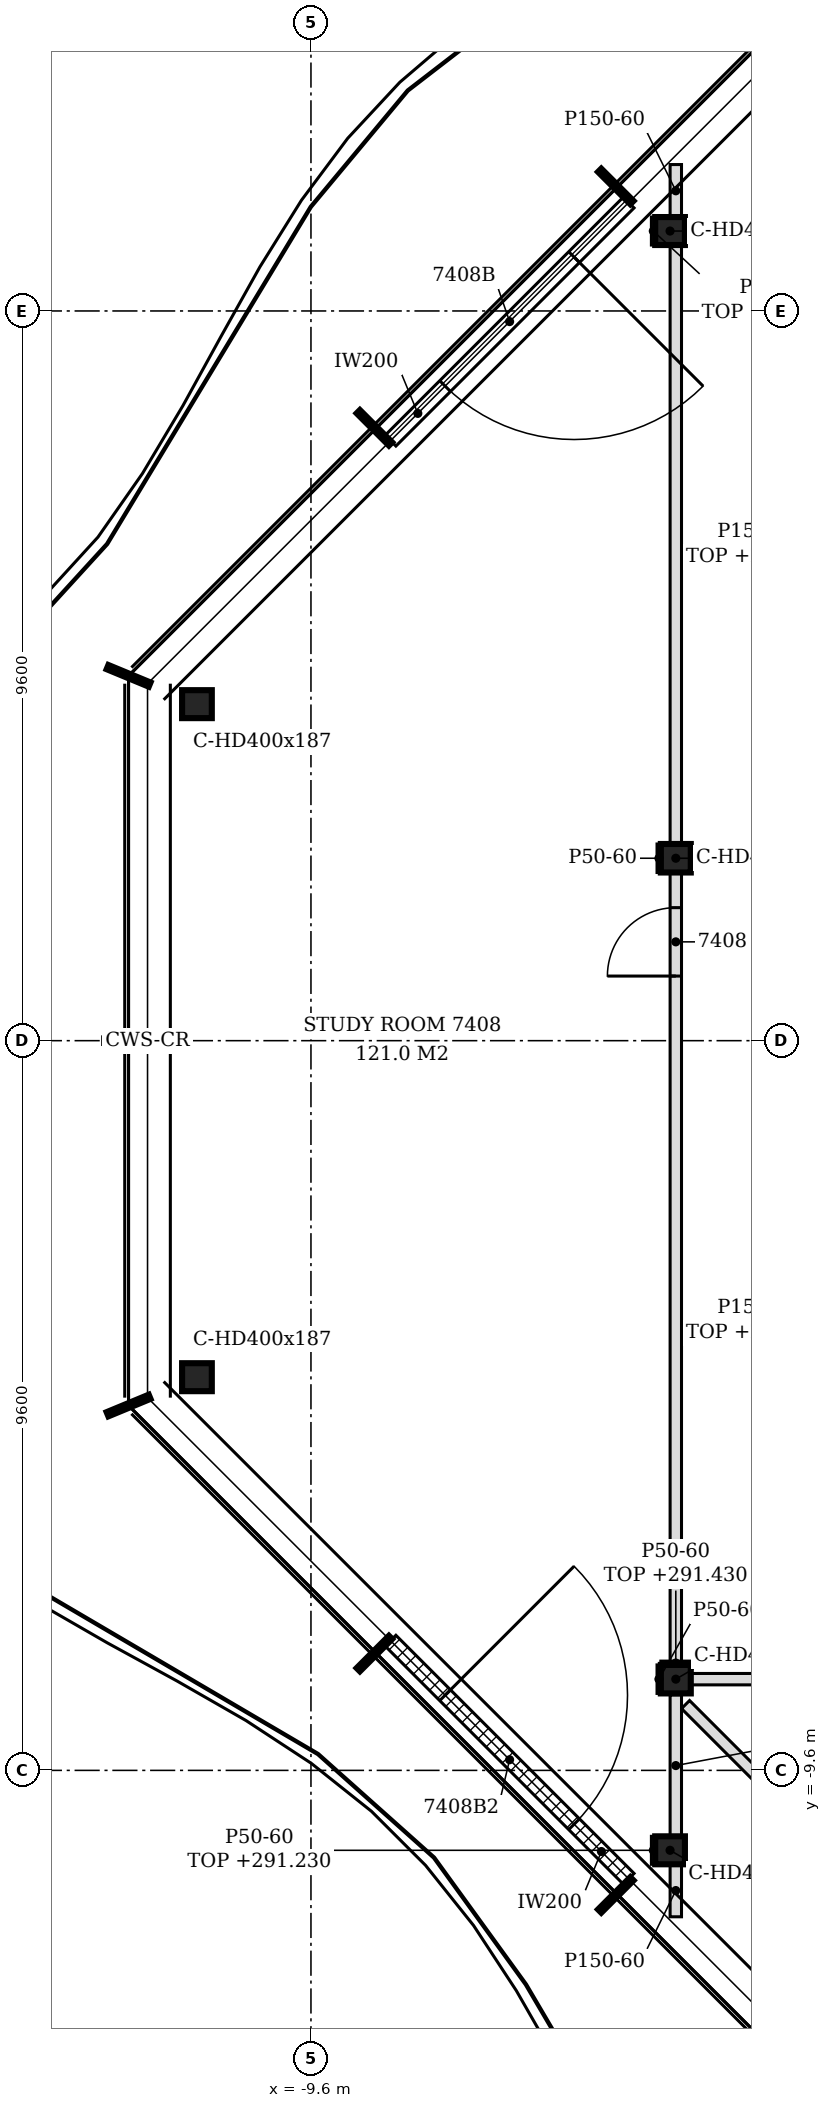
"""IFC4 building model, lengths in metres.
Left out: names, types, materials, properties, quantities, classifications, styles, units other than length and angle.
Written with IfcOpenShell. Run it as: python <this file> out.ifc"""

import sys

from ifc_helpers import new_model, si_unit, direction, frame, frame_2d, origin, origin_2d, place, context, subcontext, project, spatial, polyline, rectangle, i_section, outline, extrude, element, fill, save


model = new_model("IFC4")
c1 = context("Model", 3, precision=1e-05, world=origin(), true_north=direction((0.0, 1.0)))
c2 = subcontext(c1, "Body", "Model", "MODEL_VIEW")
j1 = project(units=[si_unit("LENGTHUNIT", "METRE"), si_unit("PLANEANGLEUNIT", "RADIAN")], contexts=[c1])
p1 = place(None, origin())
s1 = spatial("IfcSite", under=j1, at=p1, CompositionType="ELEMENT")
p2 = place(p1, origin())
s2 = spatial("IfcBuilding", under=s1, at=p2, CompositionType="ELEMENT")
p3 = place(p2, frame((0.0, 0.0, 288.6)))
s3 = spatial("IfcBuildingStorey", under=s2, at=p3, CompositionType="ELEMENT", Elevation=288.6)
for number, where, z_axis, x_axis in (
    (1, (-4.876, 10.652, -0.15), (0.0, 0.0, 1.0), (1.0, 0.0, 0.0)),
    (2, (-11.1, 4.427, -0.15), (0.0, 0.0, 1.0), (1.0, 0.0, 0.0)),
    (3, (-11.1, -4.427, -0.15), (0.0, 0.0, 1.0), (1.0, 0.0, 0.0)),
    (4, (-4.876, -10.652, -0.15), (0.0, 0.0, 1.0), (1.0, 0.0, 0.0)),
):
    element("IfcColumn", number, at=place(p3, frame(where, z_axis=z_axis, x_axis=x_axis)), inside=s3, PredefinedType="COLUMN", context=c2, shape_type="SweptSolid", body=[
        extrude(i_section(OverallWidth=0.391, OverallDepth=0.368, WebThickness=0.015, FlangeThickness=0.024, FilletRadius=0.015, at=origin_2d()), origin(), (0.0, 0.0, 1.0), 3.6),
    ])
for number, where, z_axis, x_axis in (
    (5, (-4.8, -8.4, -0.15), (0.0, 0.0, 1.0), (1.0, 0.0, 0.0)),
    (6, (-4.8, 2.4, -0.15), (0.0, 0.0, 1.0), (1.0, 0.0, 0.0)),
):
    element("IfcColumn", number, at=place(p3, frame(where, z_axis=z_axis, x_axis=x_axis)), inside=s3, PredefinedType="COLUMN", context=c2, shape_type="SweptSolid", body=[
        extrude(i_section(OverallWidth=0.394, OverallDepth=0.375, WebThickness=0.017, FlangeThickness=0.028, FilletRadius=0.015, at=origin_2d()), origin(), (0.0, 0.0, 1.0), 3.6),
    ])
p4 = place(p3, frame((-5.42, 11.026, 0.0), z_axis=(0.0, 0.0, 1.0), x_axis=(-0.707134329907, -0.707079231393, 0.0)))
e7 = element("IfcWall", 7, at=p4, inside=s3, PredefinedType="NOTDEFINED", context=c2, shape_type="SweptSolid", body=[
    extrude(rectangle(XDim=4.431, YDim=0.2, at=frame_2d((2.215, 0.0))), origin(), (0.0, 0.0, 1.0), 3.45),
])
p5 = place(p4, frame((1.015, 0.0, 0.0)))
e8 = element("IfcOpeningElement", 8, at=p5, cuts=e7, PredefinedType="OPENING", context=c2, shape_type="SweptSolid", body=[
    extrude(rectangle(XDim=2.4, YDim=2.4, at=frame_2d((1.2, 1.2))), frame((0.0, 0.11, 0.0), z_axis=(0.0, -1.0, 0.0), x_axis=(1.0, 0.0, 0.0)), (0.0, 0.0, 1.0), 0.22),
])
p6 = place(p3, frame((-8.553, -7.893, 0.0), z_axis=(0.0, 0.0, 1.0), x_axis=(0.707134329907, -0.707079231393, 0.0)))
e9 = element("IfcWall", 9, at=p6, inside=s3, PredefinedType="NOTDEFINED", context=c2, shape_type="SweptSolid", body=[
    extrude(rectangle(XDim=4.431, YDim=0.2, at=frame_2d((2.215, 0.0))), origin(), (0.0, 0.0, 1.0), 3.45),
])
p7 = place(p6, frame((1.015, 0.0, 0.0)))
e10 = element("IfcOpeningElement", 10, at=p7, cuts=e9, PredefinedType="OPENING", context=c2, shape_type="SweptSolid", body=[
    extrude(rectangle(XDim=2.4, YDim=2.4, at=frame_2d((1.2, 1.2))), frame((0.0, 0.11, 0.0), z_axis=(0.0, -1.0, 0.0), x_axis=(1.0, 0.0, 0.0)), (0.0, 0.0, 1.0), 0.22),
])
p8 = place(p3, frame((-0.128, -13.278, 0.0), z_axis=(0.0, 0.0, 1.0), x_axis=(-0.707106781187, 0.707106781187, 0.0)))
e11 = element("IfcWall", 11, at=p8, inside=s3, PredefinedType="PARTITIONING", context=c2, shape_type="SweptSolid", body=[
    extrude(rectangle(XDim=6.427, YDim=0.15, at=frame_2d((3.213, 0.0))), origin(), (0.0, 0.0, 1.0), 3.03),
])
p9 = place(p3, frame((-4.8, -11.526, 0.0), z_axis=(0.0, 0.0, 1.0), x_axis=(0.0, 1.0, 0.0)))
e12 = element("IfcWall", 12, at=p9, inside=s3, PredefinedType="PARTITIONING", context=c2, shape_type="SweptSolid", body=[
    extrude(outline(polyline([(0.0, 0.0), (0.691, 0.0), (0.691, 2.63), (0.229, 2.63), (0.227, 3.45), (0.0, 3.45), (0.0, 0.0)])), frame((0.0, 0.075, 0.0), z_axis=(0.0, -1.0, 0.0), x_axis=(1.0, 0.0, 0.0)), (0.0, 0.0, 1.0), 0.15),
])
p10 = place(p3, frame((-4.8, -10.468, 0.0), z_axis=(0.0, 0.0, 1.0), x_axis=(0.0, 1.0, 0.0)))
e13 = element("IfcWall", 13, at=p10, inside=s3, PredefinedType="PARTITIONING", context=c2, shape_type="SweptSolid", body=[
    extrude(outline(polyline([(0.0, 0.0), (1.862, 0.0), (1.862, 3.03), (0.31, 3.03), (0.308, 2.63), (0.066, 2.63), (0.064, 3.03), (0.0, 3.03), (0.0, 0.0)])), frame((0.0, 0.075, 0.0), z_axis=(0.0, -1.0, 0.0), x_axis=(1.0, 0.0, 0.0)), (0.0, 0.0, 1.0), 0.15),
])
p11 = place(p3, frame((-4.603, -8.4, 0.0), z_axis=(0.0, 0.0, 1.0), x_axis=(1.0, 0.0, 0.0)))
e14 = element("IfcWall", 14, at=p11, inside=s3, PredefinedType="PARTITIONING", context=c2, shape_type="SweptSolid", body=[
    extrude(rectangle(XDim=4.678, YDim=0.15, at=frame_2d((2.339, 0.0))), origin(), (0.0, 0.0, 1.0), 2.83),
])
p12 = place(p3, frame((-4.8, -8.212, 0.0), z_axis=(0.0, 0.0, 1.0), x_axis=(0.0, 1.0, 0.0)))
e15 = element("IfcWall", 15, at=p12, inside=s3, PredefinedType="PARTITIONING", context=c2, shape_type="SweptSolid", body=[
    extrude(rectangle(XDim=10.425, YDim=0.15, at=frame_2d((5.212, 0.0))), origin(), (0.0, 0.0, 1.0), 2.83),
])
p13 = place(p12, frame((9.062, 0.0, 0.0)))
e16 = element("IfcOpeningElement", 16, at=p13, cuts=e15, PredefinedType="OPENING", context=c2, shape_type="SweptSolid", body=[
    extrude(rectangle(XDim=0.9, YDim=2.1, at=frame_2d((0.45, 1.05))), frame((0.0, 0.085, 0.0), z_axis=(0.0, -1.0, 0.0), x_axis=(1.0, 0.0, 0.0)), (0.0, 0.0, 1.0), 0.17),
])
p14 = place(p3, frame((-4.8, 2.587, 0.0), z_axis=(0.0, 0.0, 1.0), x_axis=(0.0, 1.0, 0.0)))
e17 = element("IfcWall", 17, at=p14, inside=s3, PredefinedType="PARTITIONING", context=c2, shape_type="SweptSolid", body=[
    extrude(outline(polyline([(0.0, 0.0), (7.88, 0.0), (7.88, 2.93), (7.814, 2.93), (7.812, 2.63), (7.57, 2.63), (7.568, 2.93), (0.0, 2.93), (0.0, 0.0)])), frame((0.0, 0.075, 0.0), z_axis=(0.0, -1.0, 0.0), x_axis=(1.0, 0.0, 0.0)), (0.0, 0.0, 1.0), 0.15),
])
p15 = place(p3, frame((-4.8, 10.835, 0.0), z_axis=(0.0, 0.0, 1.0), x_axis=(0.0, 1.0, 0.0)))
e18 = element("IfcWall", 18, at=p15, inside=s3, PredefinedType="PARTITIONING", context=c2, shape_type="SweptSolid", body=[
    extrude(outline(polyline([(0.0, 0.0), (0.691, 0.0), (0.691, 3.45), (0.462, 3.45), (0.46, 2.63), (0.0, 2.63), (0.0, 0.0)])), frame((0.0, 0.075, 0.0), z_axis=(0.0, -1.0, 0.0), x_axis=(1.0, 0.0, 0.0)), (0.0, 0.0, 1.0), 0.15),
])
p16 = place(p3, frame((-5.096, -10.835, 0.0), z_axis=(0.0, 0.0, 1.0), x_axis=(0.0, 1.0, 0.0)))
e19 = element("IfcWall", 19, at=p16, inside=s3, PredefinedType="PARTITIONING", context=c2, shape_type="SweptSolid", body=[
    extrude(rectangle(XDim=0.368, YDim=0.05, at=frame_2d((0.184, 0.0))), origin(), (0.0, 0.0, 1.0), 2.63),
])
for number, where, z_axis, x_axis in (
    (20, (-5.022, -8.587, 0.0), (0.0, 0.0, 1.0), (0.0, 1.0, 0.0)),
    (21, (-5.022, 2.212, 0.0), (0.0, 0.0, 1.0), (0.0, 1.0, 0.0)),
):
    element("IfcWall", number, at=place(p3, frame(where, z_axis=z_axis, x_axis=x_axis)), inside=s3, PredefinedType="PARTITIONING", context=c2, shape_type="SweptSolid", body=[
        extrude(rectangle(XDim=0.375, YDim=0.05, at=frame_2d((0.188, 0.0))), origin(), (0.0, 0.0, 1.0), 3.45),
    ])
p17 = place(p3, frame((-5.096, 10.468, 0.0), z_axis=(0.0, 0.0, 1.0), x_axis=(0.0, 1.0, 0.0)))
e22 = element("IfcWall", 22, at=p17, inside=s3, PredefinedType="PARTITIONING", context=c2, shape_type="SweptSolid", body=[
    extrude(rectangle(XDim=0.368, YDim=0.05, at=frame_2d((0.184, 0.0))), origin(), (0.0, 0.0, 1.0), 2.63),
])
p18 = place(p3, frame((-4.997, -8.188, 0.0), z_axis=(0.0, 0.0, 1.0), x_axis=(1.0, 0.0, 0.0)))
e23 = element("IfcWall", 23, at=p18, inside=s3, PredefinedType="PARTITIONING", context=c2, shape_type="SweptSolid", body=[
    extrude(rectangle(XDim=0.394, YDim=0.05, at=frame_2d((0.197, 0.0))), origin(), (0.0, 0.0, 1.0), 2.83),
])
p19 = place(p5, origin())
e24 = element("IfcDoor", 24, at=p19, inside=s3, OperationType="SINGLE_SWING_LEFT", PredefinedType="DOOR", context=c2, shape_type="SweptSolid", body=[
    extrude(rectangle(XDim=2.4, YDim=2.4, at=frame_2d((1.2, 1.2))), frame((0.0, 0.025, 0.0), z_axis=(0.0, -1.0, 0.0), x_axis=(1.0, 0.0, 0.0)), (0.0, 0.0, 1.0), 0.05),
])
fill(e8, e24)
p20 = place(p7, origin())
e25 = element("IfcDoor", 25, at=p20, inside=s3, OperationType="SINGLE_SWING_LEFT", PredefinedType="DOOR", context=c2, shape_type="SweptSolid", body=[
    extrude(rectangle(XDim=2.4, YDim=2.4, at=frame_2d((1.2, 1.2))), frame((0.0, 0.025, 0.0), z_axis=(0.0, -1.0, 0.0), x_axis=(1.0, 0.0, 0.0)), (0.0, 0.0, 1.0), 0.05),
])
fill(e10, e25)
p21 = place(p13, origin())
e26 = element("IfcDoor", 26, at=p21, inside=s3, OperationType="SINGLE_SWING_LEFT", PredefinedType="DOOR", context=c2, shape_type="SweptSolid", body=[
    extrude(rectangle(XDim=0.9, YDim=2.1, at=frame_2d((0.45, 1.05))), frame((0.0, 0.025, 0.0), z_axis=(0.0, -1.0, 0.0), x_axis=(1.0, 0.0, 0.0)), (0.0, 0.0, 1.0), 0.05),
])
fill(e16, e26)
save(model, sys.argv[1])
